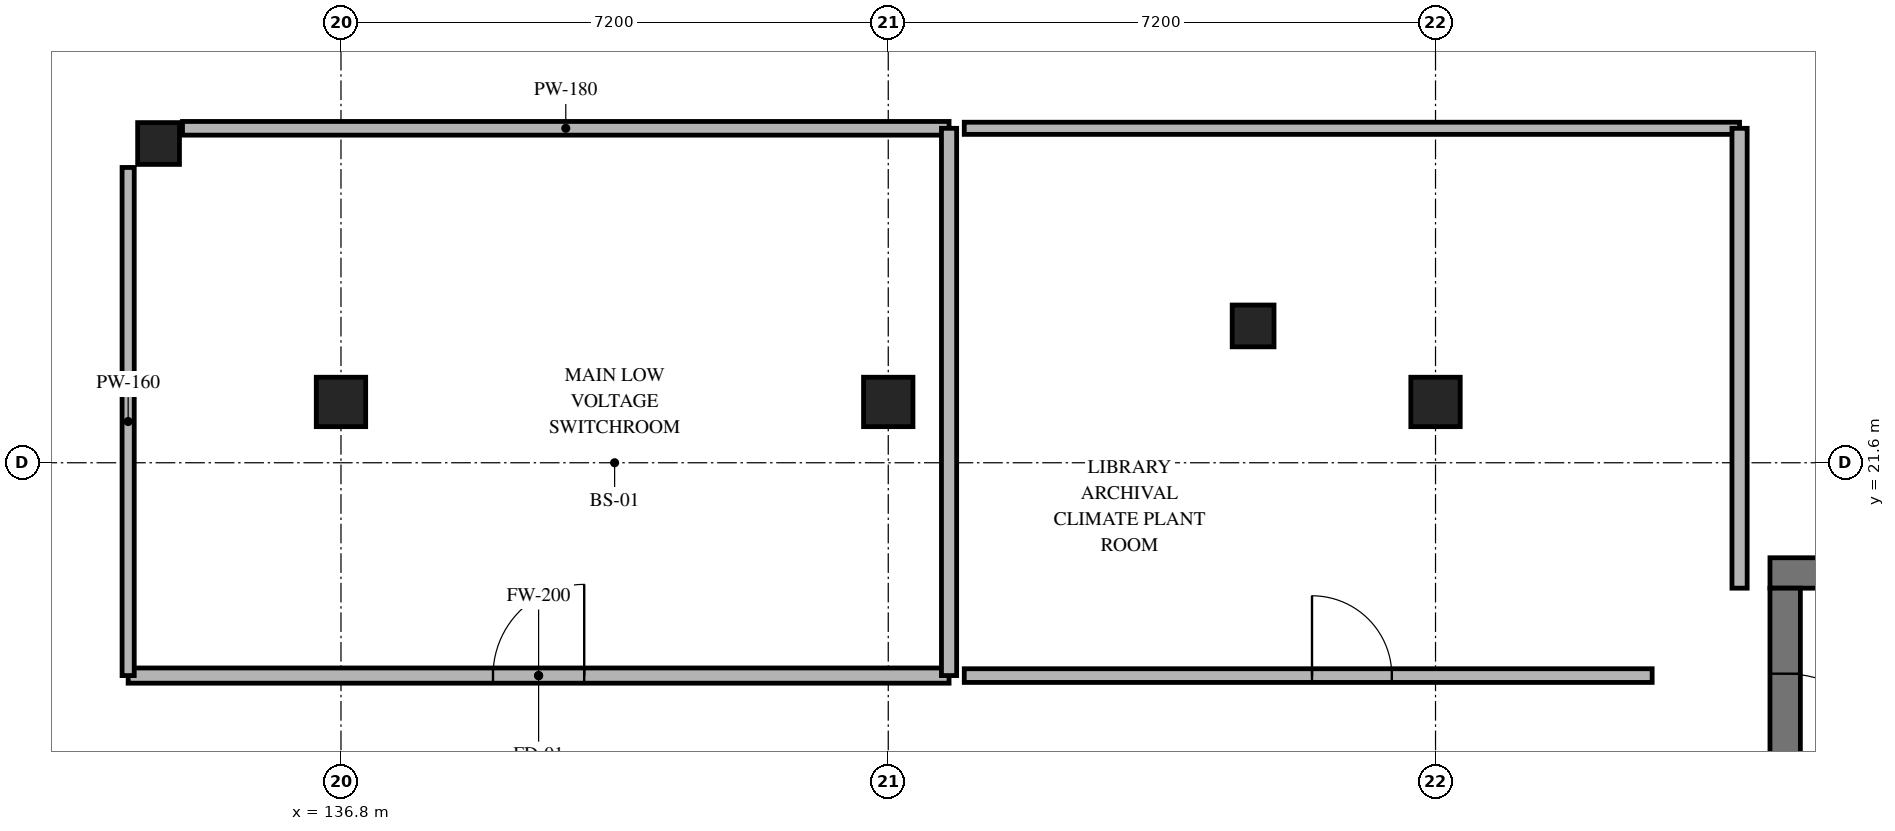
"""IFC4 building model, lengths in metres.
Left out: names, types, materials, properties, quantities, classifications, styles, units other than length and angle.
Written with IfcOpenShell. Run it as: python <this file> out.ifc"""

import sys

from ifc_helpers import new_model, si_unit, direction, frame, frame_2d, origin, origin_2d, place, context, subcontext, project, spatial, rectangle, extrude, element, fill, save


model = new_model("IFC4")
c1 = context("Model", 3, precision=1e-05, world=origin(), true_north=direction((0.0, 1.0)))
c2 = subcontext(c1, "Body", "Model", "MODEL_VIEW")
j1 = project(units=[si_unit("LENGTHUNIT", "METRE"), si_unit("PLANEANGLEUNIT", "RADIAN")], contexts=[c1])
p1 = place(None, origin())
s1 = spatial("IfcSite", under=j1, at=p1, CompositionType="ELEMENT")
p2 = place(p1, origin())
s2 = spatial("IfcBuilding", under=s1, at=p2, CompositionType="ELEMENT")
p3 = place(p2, frame((0.0, 0.0, -4.2)))
s3 = spatial("IfcBuildingStorey", under=s2, at=p3, CompositionType="ELEMENT", Elevation=-4.2)
for number, where, z_axis, x_axis in (
    (1, (136.8, 22.4, 0.0), (0.0, 0.0, 1.0), (1.0, 0.0, 0.0)),
    (2, (144.0, 22.4, 0.0), (0.0, 0.0, 1.0), (1.0, 0.0, 0.0)),
    (3, (151.2, 22.4, 0.0), (0.0, 0.0, 1.0), (1.0, 0.0, 0.0)),
):
    element("IfcColumn", number, at=place(p3, frame(where, z_axis=z_axis, x_axis=x_axis)), inside=s3, PredefinedType="COLUMN", context=c2, shape_type="SweptSolid", body=[
        extrude(rectangle(XDim=0.65, YDim=0.65, at=origin_2d()), origin(), (0.0, 0.0, 1.0), 4.2),
    ])
for number, where, z_axis, x_axis in (
    (4, (134.4, 25.8, 0.0), (0.0, 0.0, 1.0), (1.0, 0.0, 0.0)),
    (5, (148.8, 23.4, 0.0), (0.0, 0.0, 1.0), (1.0, 0.0, 0.0)),
):
    element("IfcColumn", number, at=place(p3, frame(where, z_axis=z_axis, x_axis=x_axis)), inside=s3, PredefinedType="COLUMN", context=c2, shape_type="SweptSolid", body=[
        extrude(rectangle(XDim=0.55, YDim=0.55, at=origin_2d()), origin(), (0.0, 0.0, 1.0), 4.2),
    ])
p4 = place(p3, frame((164.8, 20.15, 0.0), z_axis=(0.0, 0.0, 1.0), x_axis=(-1.0, 0.0, 0.0)))
e6 = element("IfcWall", 6, at=p4, inside=s3, PredefinedType="SHEAR", context=c2, shape_type="SweptSolid", body=[
    extrude(rectangle(XDim=9.2, YDim=0.4, at=frame_2d((4.6, 0.0))), origin(), (0.0, 0.0, 1.0), 3.92),
])
p5 = place(p3, frame((155.8, 19.95, 0.0), z_axis=(0.0, 0.0, 1.0), x_axis=(0.0, -1.0, 0.0)))
e7 = element("IfcWall", 7, at=p5, inside=s3, PredefinedType="SHEAR", context=c2, shape_type="SweptSolid", body=[
    extrude(rectangle(XDim=3.75, YDim=0.4, at=frame_2d((1.875, 0.0))), origin(), (0.0, 0.0, 1.0), 3.92),
])
p6 = place(p5, frame((1.125, 0.0, 0.0)))
e8 = element("IfcOpeningElement", 8, at=p6, cuts=e7, PredefinedType="OPENING", context=c2, shape_type="SweptSolid", body=[
    extrude(rectangle(XDim=1.5, YDim=2.2, at=frame_2d((0.75, 1.1))), frame((0.0, 0.21, 0.0), z_axis=(0.0, -1.0, 0.0), x_axis=(1.0, 0.0, 0.0)), (0.0, 0.0, 1.0), 0.42),
])
p7 = place(p3, frame((134.0, 18.8, 0.0), z_axis=(0.0, 0.0, 1.0), x_axis=(1.0, 0.0, 0.0)))
e9 = element("IfcWall", 9, at=p7, inside=s3, PredefinedType="PARTITIONING", context=c2, shape_type="SweptSolid", body=[
    extrude(rectangle(XDim=10.8, YDim=0.2, at=frame_2d((5.4, 0.0))), origin(), (0.0, 0.0, 1.0), 3.02),
])
p8 = place(p7, frame((4.8, 0.0, 0.0)))
e10 = element("IfcOpeningElement", 10, at=p8, cuts=e9, PredefinedType="OPENING", context=c2, shape_type="SweptSolid", body=[
    extrude(rectangle(XDim=1.2, YDim=2.2, at=frame_2d((0.6, 1.1))), frame((0.0, 0.11, 0.0), z_axis=(0.0, -1.0, 0.0), x_axis=(1.0, 0.0, 0.0)), (0.0, 0.0, 1.0), 0.22),
])
p9 = place(p3, frame((144.8, 26.0, 0.0), z_axis=(0.0, 0.0, 1.0), x_axis=(-1.0, 0.0, 0.0)))
e11 = element("IfcWall", 11, at=p9, inside=s3, PredefinedType="PARTITIONING", context=c2, shape_type="SweptSolid", body=[
    extrude(rectangle(XDim=10.085, YDim=0.18, at=frame_2d((5.042, 0.0))), origin(), (0.0, 0.0, 1.0), 3.02),
])
p10 = place(p3, frame((134.0, 25.485, 0.0), z_axis=(0.0, 0.0, 1.0), x_axis=(0.0, -1.0, 0.0)))
e12 = element("IfcWall", 12, at=p10, inside=s3, PredefinedType="PARTITIONING", context=c2, shape_type="SweptSolid", body=[
    extrude(rectangle(XDim=6.685, YDim=0.16, at=frame_2d((3.343, 0.0))), origin(), (0.0, 0.0, 1.0), 3.02),
])
p11 = place(p3, frame((144.8, 18.8, 0.0), z_axis=(0.0, 0.0, 1.0), x_axis=(0.0, 1.0, 0.0)))
e13 = element("IfcWall", 13, at=p11, inside=s3, PredefinedType="PARTITIONING", context=c2, shape_type="SweptSolid", body=[
    extrude(rectangle(XDim=7.2, YDim=0.2, at=frame_2d((3.6, 0.0))), origin(), (0.0, 0.0, 1.0), 3.02),
])
p12 = place(p3, frame((145.0, 18.8, 0.0), z_axis=(0.0, 0.0, 1.0), x_axis=(1.0, 0.0, 0.0)))
e14 = element("IfcWall", 14, at=p12, inside=s3, PredefinedType="PARTITIONING", context=c2, shape_type="SweptSolid", body=[
    extrude(rectangle(XDim=9.05, YDim=0.18, at=frame_2d((4.525, 0.0))), origin(), (0.0, 0.0, 1.0), 3.12),
])
p13 = place(p12, frame((4.575, 0.0, 0.0)))
e15 = element("IfcOpeningElement", 15, at=p13, cuts=e14, PredefinedType="OPENING", context=c2, shape_type="SweptSolid", body=[
    extrude(rectangle(XDim=1.05, YDim=2.15, at=frame_2d((0.525, 1.075))), frame((0.0, 0.1, 0.0), z_axis=(0.0, -1.0, 0.0), x_axis=(1.0, 0.0, 0.0)), (0.0, 0.0, 1.0), 0.2),
])
p14 = place(p3, frame((155.2, 26.0, 0.0), z_axis=(0.0, 0.0, 1.0), x_axis=(-1.0, 0.0, 0.0)))
e16 = element("IfcWall", 16, at=p14, inside=s3, PredefinedType="PARTITIONING", context=c2, shape_type="SweptSolid", body=[
    extrude(rectangle(XDim=10.2, YDim=0.16, at=frame_2d((5.1, 0.0))), origin(), (0.0, 0.0, 1.0), 3.02),
])
p15 = place(p3, frame((155.2, 19.95, 0.0), z_axis=(0.0, 0.0, 1.0), x_axis=(0.0, 1.0, 0.0)))
e17 = element("IfcWall", 17, at=p15, inside=s3, PredefinedType="PARTITIONING", context=c2, shape_type="SweptSolid", body=[
    extrude(rectangle(XDim=6.05, YDim=0.2, at=frame_2d((3.025, 0.0))), origin(), (0.0, 0.0, 1.0), 3.07),
])
p16 = place(p6, origin())
e18 = element("IfcDoor", 18, at=p16, inside=s3, OperationType="SINGLE_SWING_RIGHT", PredefinedType="DOOR", context=c2, shape_type="SweptSolid", body=[
    extrude(rectangle(XDim=1.5, YDim=2.2, at=frame_2d((0.75, 1.1))), frame((0.0, 0.025, 0.0), z_axis=(0.0, -1.0, 0.0), x_axis=(1.0, 0.0, 0.0)), (0.0, 0.0, 1.0), 0.05),
])
fill(e8, e18)
p17 = place(p8, origin())
e19 = element("IfcDoor", 19, at=p17, inside=s3, OperationType="SINGLE_SWING_RIGHT", PredefinedType="DOOR", context=c2, shape_type="SweptSolid", body=[
    extrude(rectangle(XDim=1.2, YDim=2.2, at=frame_2d((0.6, 1.1))), frame((0.0, 0.025, 0.0), z_axis=(0.0, -1.0, 0.0), x_axis=(1.0, 0.0, 0.0)), (0.0, 0.0, 1.0), 0.05),
])
fill(e10, e19)
p18 = place(p13, origin())
e20 = element("IfcDoor", 20, at=p18, inside=s3, OperationType="SINGLE_SWING_LEFT", PredefinedType="DOOR", context=c2, shape_type="SweptSolid", body=[
    extrude(rectangle(XDim=1.05, YDim=2.15, at=frame_2d((0.525, 1.075))), frame((0.0, 0.025, 0.0), z_axis=(0.0, -1.0, 0.0), x_axis=(1.0, 0.0, 0.0)), (0.0, 0.0, 1.0), 0.05),
])
fill(e15, e20)
save(model, sys.argv[1])
